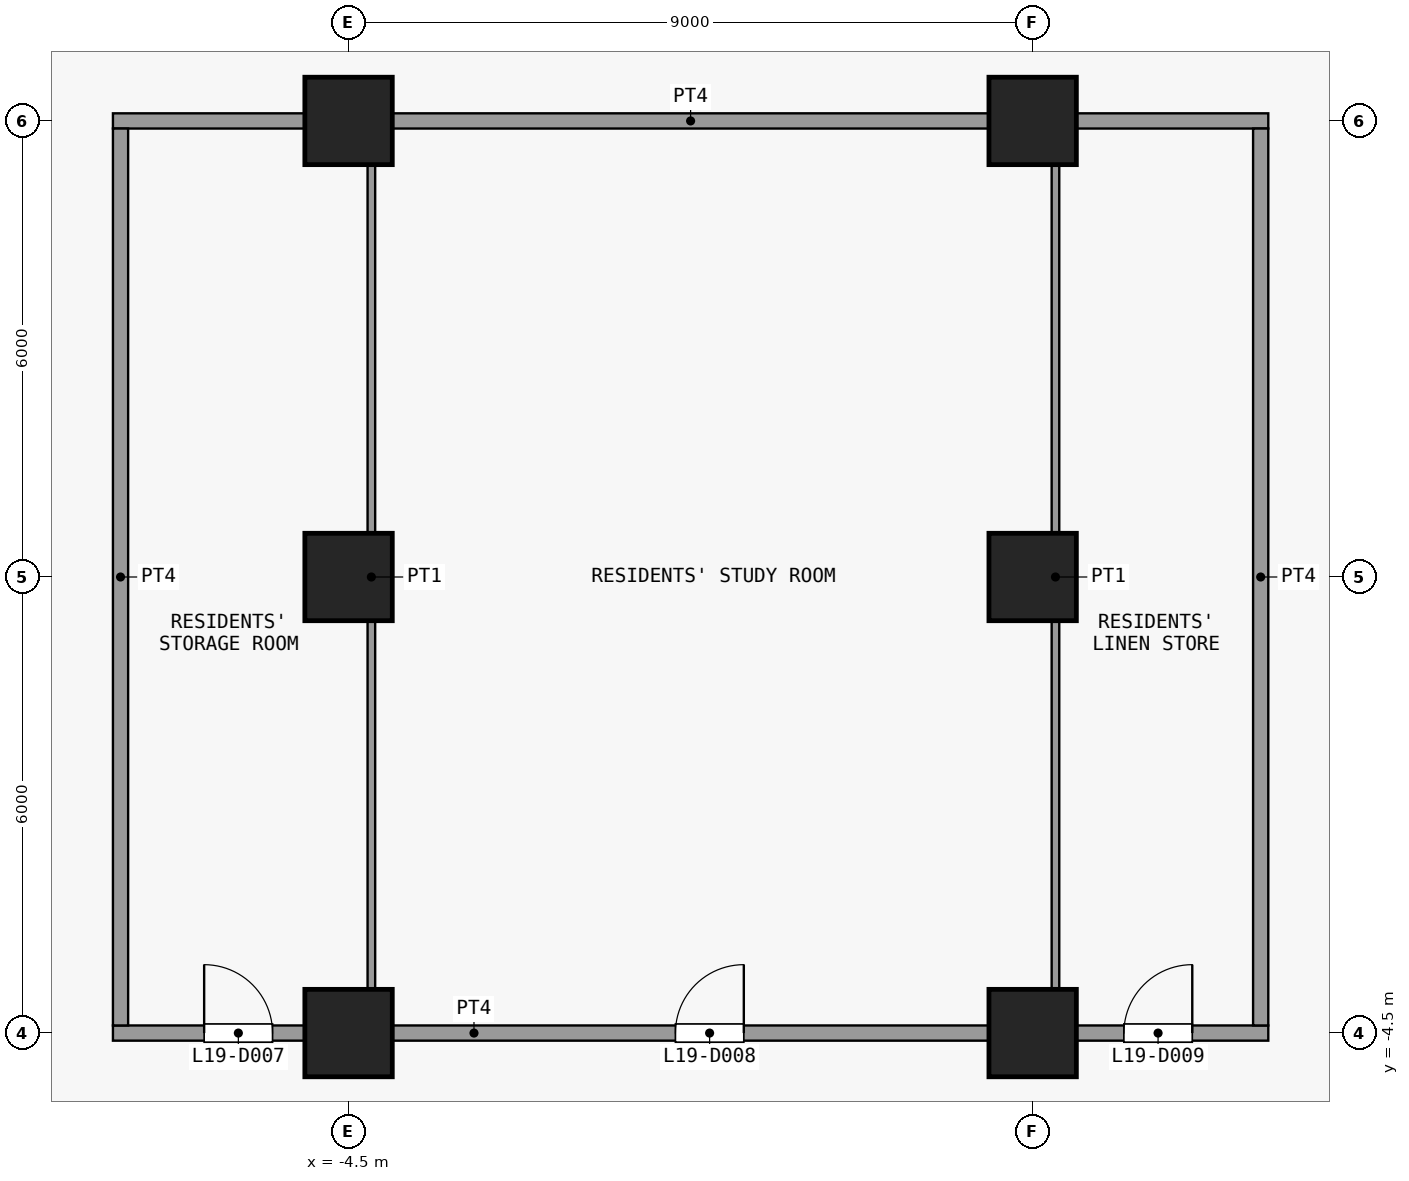
"""IFC4 building model, lengths in metres.
Left out: names, types, materials, properties, quantities, classifications, styles, units other than length and angle.
Written with IfcOpenShell. Run it as: python <this file> out.ifc"""

import sys

from ifc_helpers import new_model, si_unit, direction, frame, frame_2d, origin, origin_2d, place, context, subcontext, project, spatial, rectangle, extrude, element, fill, save


model = new_model("IFC4")
c1 = context("Model", 3, precision=1e-05, world=origin(), true_north=direction((0.0, 1.0)))
c2 = subcontext(c1, "Body", "Model", "MODEL_VIEW")
j1 = project(units=[si_unit("LENGTHUNIT", "METRE"), si_unit("PLANEANGLEUNIT", "RADIAN")], contexts=[c1])
p1 = place(None, origin())
s1 = spatial("IfcSite", under=j1, at=p1, CompositionType="ELEMENT")
p2 = place(p1, origin())
s2 = spatial("IfcBuilding", under=s1, at=p2, CompositionType="ELEMENT")
p3 = place(p2, frame((0.0, 0.0, 81.1)))
s3 = spatial("IfcBuildingStorey", under=s2, at=p3, CompositionType="ELEMENT", Elevation=81.1)
for number, where, z_axis, x_axis in (
    (1, (-4.5, -4.5, 0.0), (0.0, 0.0, 1.0), (1.0, 0.0, 0.0)),
    (2, (-4.5, 1.5, 0.0), (0.0, 0.0, 1.0), (1.0, 0.0, 0.0)),
    (3, (-4.5, 7.5, 0.0), (0.0, 0.0, 1.0), (1.0, 0.0, 0.0)),
    (4, (4.5, -4.5, 0.0), (0.0, 0.0, 1.0), (1.0, 0.0, 0.0)),
    (5, (4.5, 1.5, 0.0), (0.0, 0.0, 1.0), (1.0, 0.0, 0.0)),
    (6, (4.5, 7.5, 0.0), (0.0, 0.0, 1.0), (1.0, 0.0, 0.0)),
):
    element("IfcColumn", number, at=place(p3, frame(where, z_axis=z_axis, x_axis=x_axis)), inside=s3, PredefinedType="COLUMN", context=c2, shape_type="SweptSolid", body=[
        extrude(rectangle(XDim=1.15, YDim=1.15, at=origin_2d()), origin(), (0.0, 0.0, 1.0), 3.6),
    ])
p4 = place(p3, frame((-7.6, -4.5, 0.0), z_axis=(0.0, 0.0, 1.0), x_axis=(1.0, 0.0, 0.0)))
e7 = element("IfcWall", 7, at=p4, inside=s3, PredefinedType="PARTITIONING", context=c2, shape_type="SweptSolid", body=[
    extrude(rectangle(XDim=15.2, YDim=0.2, at=frame_2d((7.6, 0.0))), origin(), (0.0, 0.0, 1.0), 3.3),
])
p5 = place(p4, frame((1.2, 0.0, 0.0)))
e8 = element("IfcOpeningElement", 8, at=p5, cuts=e7, PredefinedType="OPENING", context=c2, shape_type="SweptSolid", body=[
    extrude(rectangle(XDim=0.9, YDim=2.1, at=frame_2d((0.45, 1.05))), frame((0.0, 0.11, 0.0), z_axis=(0.0, -1.0, 0.0), x_axis=(1.0, 0.0, 0.0)), (0.0, 0.0, 1.0), 0.22),
])
p6 = place(p4, frame((7.4, 0.0, 0.0)))
e9 = element("IfcOpeningElement", 9, at=p6, cuts=e7, PredefinedType="OPENING", context=c2, shape_type="SweptSolid", body=[
    extrude(rectangle(XDim=0.9, YDim=2.1, at=frame_2d((0.45, 1.05))), frame((0.0, 0.11, 0.0), z_axis=(0.0, -1.0, 0.0), x_axis=(1.0, 0.0, 0.0)), (0.0, 0.0, 1.0), 0.22),
])
p7 = place(p4, frame((13.3, 0.0, 0.0)))
e10 = element("IfcOpeningElement", 10, at=p7, cuts=e7, PredefinedType="OPENING", context=c2, shape_type="SweptSolid", body=[
    extrude(rectangle(XDim=0.9, YDim=2.1, at=frame_2d((0.45, 1.05))), frame((0.0, 0.11, 0.0), z_axis=(0.0, -1.0, 0.0), x_axis=(1.0, 0.0, 0.0)), (0.0, 0.0, 1.0), 0.22),
])
p8 = place(p3, frame((-7.6, 7.5, 0.0), z_axis=(0.0, 0.0, 1.0), x_axis=(1.0, 0.0, 0.0)))
e11 = element("IfcWall", 11, at=p8, inside=s3, PredefinedType="PARTITIONING", context=c2, shape_type="SweptSolid", body=[
    extrude(rectangle(XDim=15.2, YDim=0.2, at=frame_2d((7.6, 0.0))), origin(), (0.0, 0.0, 1.0), 3.3),
])
p9 = place(p3, frame((-7.5, -4.4, 0.0), z_axis=(0.0, 0.0, 1.0), x_axis=(0.0, 1.0, 0.0)))
e12 = element("IfcWall", 12, at=p9, inside=s3, PredefinedType="PARTITIONING", context=c2, shape_type="SweptSolid", body=[
    extrude(rectangle(XDim=11.8, YDim=0.2, at=frame_2d((5.9, 0.0))), origin(), (0.0, 0.0, 1.0), 3.3),
])
for number, where, z_axis, x_axis in (
    (13, (-4.2, -4.4, 0.0), (0.0, 0.0, 1.0), (0.0, 1.0, 0.0)),
    (14, (4.8, -4.4, 0.0), (0.0, 0.0, 1.0), (0.0, 1.0, 0.0)),
):
    element("IfcWall", number, at=place(p3, frame(where, z_axis=z_axis, x_axis=x_axis)), inside=s3, PredefinedType="PARTITIONING", context=c2, shape_type="SweptSolid", body=[
        extrude(rectangle(XDim=11.8, YDim=0.1, at=frame_2d((5.9, 0.0))), origin(), (0.0, 0.0, 1.0), 3.3),
    ])
p10 = place(p3, frame((7.5, -4.4, 0.0), z_axis=(0.0, 0.0, 1.0), x_axis=(0.0, 1.0, 0.0)))
e15 = element("IfcWall", 15, at=p10, inside=s3, PredefinedType="PARTITIONING", context=c2, shape_type="SweptSolid", body=[
    extrude(rectangle(XDim=11.8, YDim=0.2, at=frame_2d((5.9, 0.0))), origin(), (0.0, 0.0, 1.0), 3.3),
])
p11 = place(p5, origin())
e16 = element("IfcDoor", 16, at=p11, inside=s3, OperationType="SINGLE_SWING_RIGHT", PredefinedType="DOOR", context=c2, shape_type="SweptSolid", body=[
    extrude(rectangle(XDim=0.9, YDim=2.1, at=frame_2d((0.45, 1.05))), frame((0.0, 0.025, 0.0), z_axis=(0.0, -1.0, 0.0), x_axis=(1.0, 0.0, 0.0)), (0.0, 0.0, 1.0), 0.05),
])
fill(e8, e16)
p12 = place(p6, origin())
e17 = element("IfcDoor", 17, at=p12, inside=s3, OperationType="SINGLE_SWING_LEFT", PredefinedType="DOOR", context=c2, shape_type="SweptSolid", body=[
    extrude(rectangle(XDim=0.9, YDim=2.1, at=frame_2d((0.45, 1.05))), frame((0.0, 0.025, 0.0), z_axis=(0.0, -1.0, 0.0), x_axis=(1.0, 0.0, 0.0)), (0.0, 0.0, 1.0), 0.05),
])
fill(e9, e17)
p13 = place(p7, origin())
e18 = element("IfcDoor", 18, at=p13, inside=s3, OperationType="SINGLE_SWING_LEFT", PredefinedType="DOOR", context=c2, shape_type="SweptSolid", body=[
    extrude(rectangle(XDim=0.9, YDim=2.1, at=frame_2d((0.45, 1.05))), frame((0.0, 0.025, 0.0), z_axis=(0.0, -1.0, 0.0), x_axis=(1.0, 0.0, 0.0)), (0.0, 0.0, 1.0), 0.05),
])
fill(e10, e18)
save(model, sys.argv[1])
